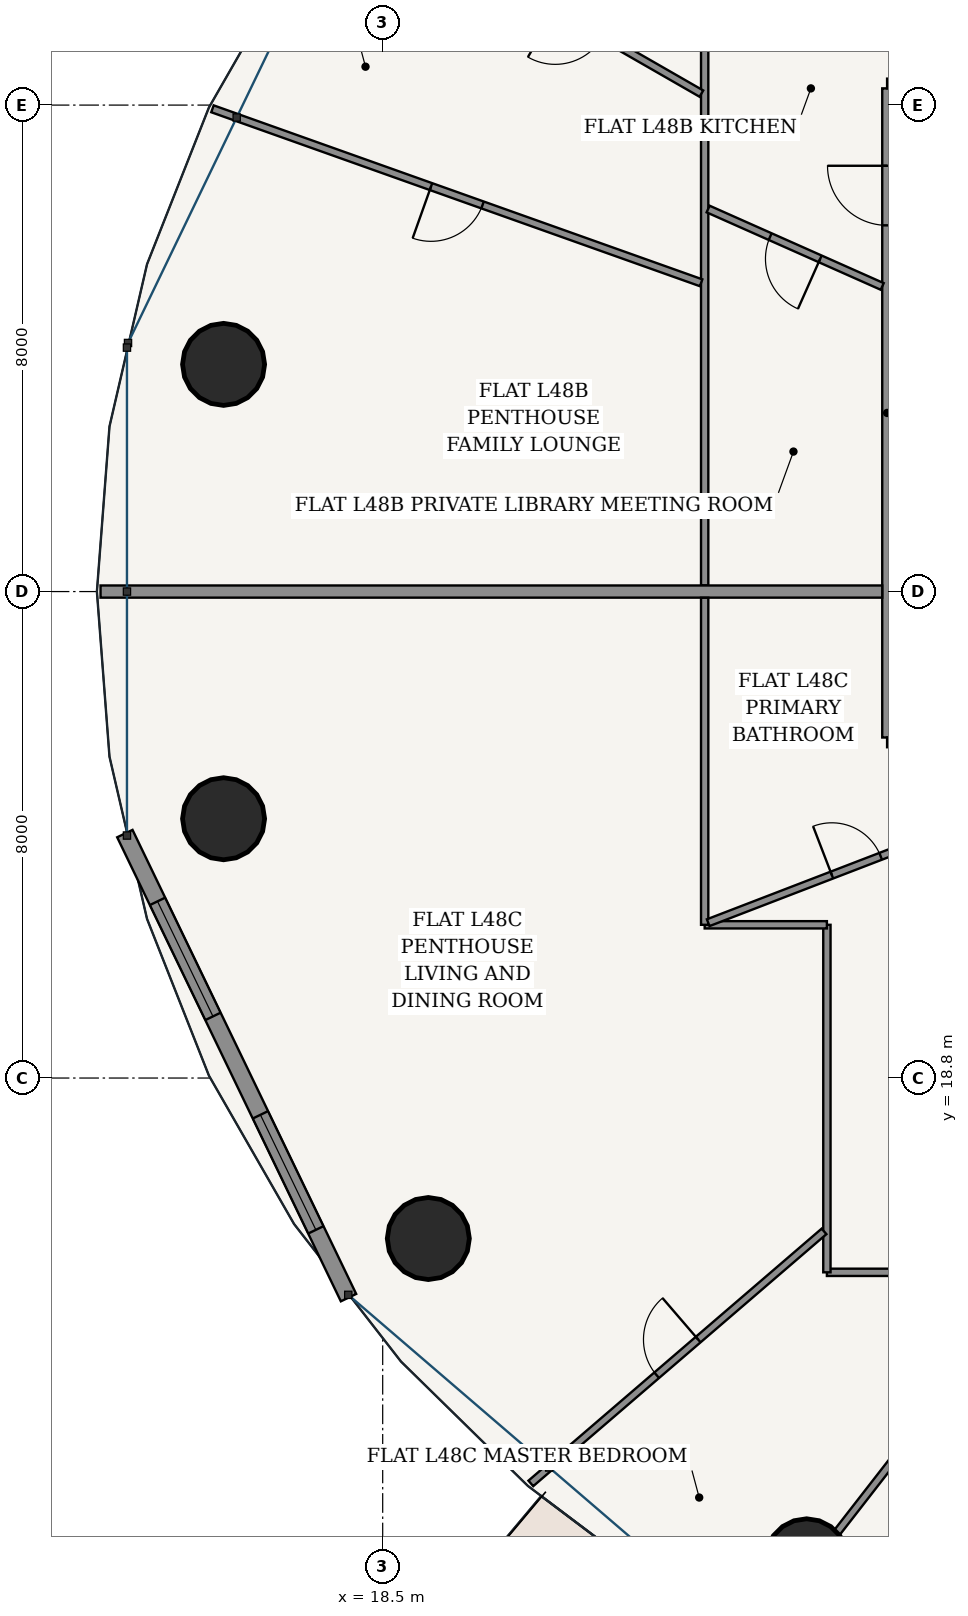
"""IFC4 building model, lengths in metres.
Left out: names, types, materials, properties, quantities, classifications, styles, units other than length and angle.
Written with IfcOpenShell. Run it as: python <this file> out.ifc"""

import sys

from ifc_helpers import new_model, si_unit, direction, frame, frame_2d, origin, origin_2d, place, context, subcontext, project, spatial, rectangle, hollow_circle, extrude, source, transform, mapped, element, fill, save


model = new_model("IFC4")
c1 = context("Model", 3, precision=1e-05, world=origin(), true_north=direction((-0.2419218956, 0.970295726276)))
c2 = subcontext(c1, "Body", "Model", "MODEL_VIEW")
j1 = project(units=[si_unit("LENGTHUNIT", "METRE"), si_unit("PLANEANGLEUNIT", "RADIAN")], contexts=[c1])
p1 = place(None, origin())
s1 = spatial("IfcSite", under=j1, at=p1, CompositionType="ELEMENT")
p2 = place(p1, origin())
s2 = spatial("IfcBuilding", under=s1, at=p2, CompositionType="ELEMENT")
p3 = place(p2, frame((0.0, 0.0, 182.2)))
s3 = spatial("IfcBuildingStorey", under=s2, at=p3, CompositionType="ELEMENT", Elevation=182.2)
for number, where, z_axis, x_axis in (
    (1, (15.883, 30.536, 0.0), (0.0, 0.0, 1.0), (1.0, 0.0, 0.0)),
    (2, (15.883, 23.064, 0.0), (0.0, 0.0, 1.0), (1.0, 0.0, 0.0)),
    (3, (19.25, 16.161, 0.0), (0.0, 0.0, 1.0), (1.0, 0.0, 0.0)),
    (4, (25.472, 10.877, 0.0), (0.0, 0.0, 1.0), (1.0, 0.0, 0.0)),
):
    element("IfcColumn", number, at=place(p3, frame(where, z_axis=z_axis, x_axis=x_axis)), inside=s3, PredefinedType="COLUMN", context=c2, shape_type="SweptSolid", body=[
        extrude(hollow_circle(Radius=0.675, WallThickness=0.042, at=origin_2d()), origin(), (0.0, 0.0, 1.0), 3.6),
    ])
p4 = place(p3, frame((14.26, 22.82, 0.0), z_axis=(0.0, 0.0, 1.0), x_axis=(0.434209827226, -0.900811759437, 0.0)))
e5 = element("IfcWall", 5, at=p4, inside=s3, PredefinedType="SOLIDWALL", context=c2, shape_type="SweptSolid", body=[
    extrude(rectangle(XDim=8.472, YDim=0.28, at=frame_2d((4.236, 0.0))), origin(), (0.0, 0.0, 1.0), 3.15),
])
p5 = place(p4, frame((1.237, 0.0, 0.85)))
e6 = element("IfcOpeningElement", 6, at=p5, cuts=e5, PredefinedType="OPENING", context=c2, shape_type="SweptSolid", body=[
    extrude(rectangle(XDim=2.1, YDim=1.95, at=frame_2d((1.05, 0.975))), frame((0.0, 0.15, 0.0), z_axis=(0.0, -1.0, 0.0), x_axis=(1.0, 0.0, 0.0)), (0.0, 0.0, 1.0), 0.3),
])
p6 = place(p4, frame((5.134, 0.0, 0.85)))
e7 = element("IfcOpeningElement", 7, at=p6, cuts=e5, PredefinedType="OPENING", context=c2, shape_type="SweptSolid", body=[
    extrude(rectangle(XDim=2.1, YDim=1.95, at=frame_2d((1.05, 0.975))), frame((0.0, 0.15, 0.0), z_axis=(0.0, -1.0, 0.0), x_axis=(1.0, 0.0, 0.0)), (0.0, 0.0, 1.0), 0.3),
])
p7 = place(p3, frame((26.795, 24.4, 0.0), z_axis=(0.0, 0.0, 1.0), x_axis=(0.0, 1.0, 0.0)))
e8 = element("IfcWall", 8, at=p7, inside=s3, PredefinedType="PARTITIONING", context=c2, shape_type="SweptSolid", body=[
    extrude(rectangle(XDim=10.675, YDim=0.16, at=frame_2d((5.337, 0.0))), origin(), (0.0, 0.0, 1.0), 2.666),
])
p8 = place(p7, frame((8.422, 0.0, 0.0)))
e9 = element("IfcOpeningElement", 9, at=p8, cuts=e8, PredefinedType="OPENING", context=c2, shape_type="SweptSolid", body=[
    extrude(rectangle(XDim=0.98, YDim=2.2, at=frame_2d((0.49, 1.1))), frame((0.0, 0.09, 0.0), z_axis=(0.0, -1.0, 0.0), x_axis=(1.0, 0.0, 0.0)), (0.0, 0.0, 1.0), 0.18),
])
for number, where, z_axis, x_axis in (
    (10, (26.795, 35.155, 0.0), (0.0, 0.0, 1.0), (1.0, 0.0, 0.0)),
    (11, (26.795, 24.32, 0.0), (0.0, 0.0, 1.0), (1.0, 0.0, 0.0)),
):
    element("IfcWall", number, at=place(p3, frame(where, z_axis=z_axis, x_axis=x_axis)), inside=s3, PredefinedType="PARTITIONING", context=c2, shape_type="SweptSolid", body=[
        extrude(rectangle(XDim=1.93, YDim=0.16, at=frame_2d((0.965, 0.0))), origin(), (0.0, 0.0, 1.0), 3.15),
    ])
p9 = place(p3, frame((23.795, 26.902, 0.0), z_axis=(0.0, 0.0, 1.0), x_axis=(0.0, 1.0, 0.0)))
e12 = element("IfcWall", 12, at=p9, inside=s3, PredefinedType="PARTITIONING", context=c2, shape_type="SweptSolid", body=[
    extrude(rectangle(XDim=11.253, YDim=0.12, at=frame_2d((5.626, 0.0))), origin(), (0.0, 0.0, 1.0), 2.666),
])
p10 = place(p9, frame((9.085, 0.0, 0.0)))
e13 = element("IfcOpeningElement", 13, at=p10, cuts=e12, PredefinedType="OPENING", context=c2, shape_type="SweptSolid", body=[
    extrude(rectangle(XDim=0.9, YDim=2.15, at=frame_2d((0.45, 1.075))), frame((0.0, 0.07, 0.0), z_axis=(0.0, -1.0, 0.0), x_axis=(1.0, 0.0, 0.0)), (0.0, 0.0, 1.0), 0.14),
])
p11 = place(p3, frame((23.741, 34.989, 0.0), z_axis=(0.0, 0.0, 1.0), x_axis=(-0.867167953258, 0.498015803808, 0.0)))
e14 = element("IfcWall", 14, at=p11, inside=s3, PredefinedType="PARTITIONING", context=c2, shape_type="SweptSolid", body=[
    extrude(rectangle(XDim=6.65, YDim=0.12, at=frame_2d((3.325, 0.0))), origin(), (0.0, 0.0, 1.0), 2.5),
])
p12 = place(p11, frame((1.873, 0.0, 0.0)))
e15 = element("IfcOpeningElement", 15, at=p12, cuts=e14, PredefinedType="OPENING", context=c2, shape_type="SweptSolid", body=[
    extrude(rectangle(XDim=0.9, YDim=2.15, at=frame_2d((0.45, 1.075))), frame((0.0, 0.07, 0.0), z_axis=(0.0, -1.0, 0.0), x_axis=(1.0, 0.0, 0.0)), (0.0, 0.0, 1.0), 0.14),
])
p13 = place(p3, frame((23.737, 31.878, 0.0), z_axis=(0.0, 0.0, 1.0), x_axis=(-0.942071057968, 0.335413359512, 0.0)))
e16 = element("IfcWall", 16, at=p13, inside=s3, PredefinedType="PARTITIONING", context=c2, shape_type="SweptSolid", body=[
    extrude(rectangle(XDim=8.53, YDim=0.12, at=frame_2d((4.265, 0.0))), origin(), (0.0, 0.0, 1.0), 2.666),
])
p14 = place(p13, frame((3.815, 0.0, 0.0)))
e17 = element("IfcOpeningElement", 17, at=p14, cuts=e16, PredefinedType="OPENING", context=c2, shape_type="SweptSolid", body=[
    extrude(rectangle(XDim=0.9, YDim=2.15, at=frame_2d((0.45, 1.075))), frame((0.0, 0.07, 0.0), z_axis=(0.0, -1.0, 0.0), x_axis=(1.0, 0.0, 0.0)), (0.0, 0.0, 1.0), 0.14),
])
p15 = place(p3, frame((28.032, 35.236, 0.0), z_axis=(0.0, 0.0, 1.0), x_axis=(-0.763321857138, 0.646018376221, 0.0)))
e18 = element("IfcWall", 18, at=p15, inside=s3, PredefinedType="PARTITIONING", context=c2, shape_type="SweptSolid", body=[
    extrude(rectangle(XDim=4.456, YDim=0.12, at=frame_2d((2.228, 0.0))), origin(), (0.0, 0.0, 1.0), 2.825),
])
p16 = place(p3, frame((26.715, 31.818, 0.0), z_axis=(0.0, 0.0, 1.0), x_axis=(-0.913750499147, 0.406275799561, 0.0)))
e19 = element("IfcWall", 19, at=p16, inside=s3, PredefinedType="PARTITIONING", context=c2, shape_type="SweptSolid", body=[
    extrude(rectangle(XDim=3.134, YDim=0.12, at=frame_2d((1.567, 0.0))), origin(), (0.0, 0.0, 1.0), 2.825),
])
p17 = place(p16, frame((1.117, 0.0, 0.0)))
e20 = element("IfcOpeningElement", 20, at=p17, cuts=e19, PredefinedType="OPENING", context=c2, shape_type="SweptSolid", body=[
    extrude(rectangle(XDim=0.9, YDim=2.15, at=frame_2d((0.45, 1.075))), frame((0.0, 0.07, 0.0), z_axis=(0.0, -1.0, 0.0), x_axis=(1.0, 0.0, 0.0)), (0.0, 0.0, 1.0), 0.14),
])
p18 = place(p3, frame((26.715, 26.8, 0.0), z_axis=(0.0, 0.0, 1.0), x_axis=(-1.0, 0.0, 0.0)))
e21 = element("IfcWall", 21, at=p18, inside=s3, PredefinedType="PARTITIONING", context=c2, shape_type="SweptSolid", body=[
    extrude(rectangle(XDim=12.855, YDim=0.2, at=frame_2d((6.427, 0.0))), origin(), (0.0, 0.0, 1.0), 2.666),
])
p19 = place(p3, frame((31.32, 15.605, 0.0), z_axis=(0.0, 0.0, 1.0), x_axis=(-1.0, 0.0, 0.0)))
e22 = element("IfcWall", 22, at=p19, inside=s3, PredefinedType="PARTITIONING", context=c2, shape_type="SweptSolid", body=[
    extrude(rectangle(XDim=5.515, YDim=0.12, at=frame_2d((2.758, 0.0))), origin(), (0.0, 0.0, 1.0), 2.666),
])
p20 = place(p3, frame((25.805, 15.605, 0.0), z_axis=(0.0, 0.0, 1.0), x_axis=(0.0, 1.0, 0.0)))
e23 = element("IfcWall", 23, at=p20, inside=s3, PredefinedType="PARTITIONING", context=c2, shape_type="SweptSolid", body=[
    extrude(rectangle(XDim=5.715, YDim=0.12, at=frame_2d((2.857, 0.0))), origin(), (0.0, 0.0, 1.0), 2.666),
])
p21 = place(p3, frame((25.805, 21.32, 0.0), z_axis=(0.0, 0.0, 1.0), x_axis=(-1.0, 0.0, 0.0)))
e24 = element("IfcWall", 24, at=p21, inside=s3, PredefinedType="PARTITIONING", context=c2, shape_type="SweptSolid", body=[
    extrude(rectangle(XDim=2.01, YDim=0.12, at=frame_2d((1.005, 0.0))), origin(), (0.0, 0.0, 1.0), 2.825),
])
p22 = place(p3, frame((23.795, 21.32, 0.0), z_axis=(0.0, 0.0, 1.0), x_axis=(0.0, 1.0, 0.0)))
e25 = element("IfcWall", 25, at=p22, inside=s3, PredefinedType="PARTITIONING", context=c2, shape_type="SweptSolid", body=[
    extrude(rectangle(XDim=5.378, YDim=0.12, at=frame_2d((2.689, 0.0))), origin(), (0.0, 0.0, 1.0), 2.666),
])
p23 = place(p3, frame((25.758, 16.278, 0.0), z_axis=(0.0, 0.0, 1.0), x_axis=(-0.758374994665, -0.651818508073, 0.0)))
e26 = element("IfcWall", 26, at=p23, inside=s3, PredefinedType="PARTITIONING", context=c2, shape_type="SweptSolid", body=[
    extrude(rectangle(XDim=6.358, YDim=0.12, at=frame_2d((3.179, 0.0))), origin(), (0.0, 0.0, 1.0), 2.666),
])
p24 = place(p23, frame((2.729, 0.0, 0.0)))
e27 = element("IfcOpeningElement", 27, at=p24, cuts=e26, PredefinedType="OPENING", context=c2, shape_type="SweptSolid", body=[
    extrude(rectangle(XDim=0.9, YDim=2.15, at=frame_2d((0.45, 1.075))), frame((0.0, 0.07, 0.0), z_axis=(0.0, -1.0, 0.0), x_axis=(1.0, 0.0, 0.0)), (0.0, 0.0, 1.0), 0.14),
])
p25 = place(p3, frame((29.259, 15.556, 0.0), z_axis=(0.0, 0.0, 1.0), x_axis=(-0.61375493029, -0.789496602617, 0.0)))
e28 = element("IfcWall", 28, at=p25, inside=s3, PredefinedType="PARTITIONING", context=c2, shape_type="SweptSolid", body=[
    extrude(rectangle(XDim=7.556, YDim=0.12, at=frame_2d((3.778, 0.0))), origin(), (0.0, 0.0, 1.0), 2.5),
])
p26 = place(p25, frame((2.325, 0.0, 0.0)))
e29 = element("IfcOpeningElement", 29, at=p26, cuts=e28, PredefinedType="OPENING", context=c2, shape_type="SweptSolid", body=[
    extrude(rectangle(XDim=0.9, YDim=2.15, at=frame_2d((0.45, 1.075))), frame((0.0, 0.07, 0.0), z_axis=(0.0, -1.0, 0.0), x_axis=(1.0, 0.0, 0.0)), (0.0, 0.0, 1.0), 0.14),
])
p27 = place(p3, frame((28.723, 23.229, 0.0), z_axis=(0.0, 0.0, 1.0), x_axis=(-0.933262385607, -0.359195378048, 0.0)))
e30 = element("IfcWall", 30, at=p27, inside=s3, PredefinedType="PARTITIONING", context=c2, shape_type="SweptSolid", body=[
    extrude(rectangle(XDim=5.219, YDim=0.12, at=frame_2d((2.609, 0.0))), origin(), (0.0, 0.0, 1.0), 2.825),
])
p28 = place(p27, frame((2.179, 0.0, 0.0)))
e31 = element("IfcOpeningElement", 31, at=p28, cuts=e30, PredefinedType="OPENING", context=c2, shape_type="SweptSolid", body=[
    extrude(rectangle(XDim=0.86, YDim=2.15, at=frame_2d((0.43, 1.075))), frame((0.0, 0.07, 0.0), z_axis=(0.0, -1.0, 0.0), x_axis=(1.0, 0.0, 0.0)), (0.0, 0.0, 1.0), 0.14),
])
m1 = source(origin(), c2, "Body", "SweptSolid", [
    extrude(rectangle(XDim=2.1, YDim=1.95, at=frame_2d((1.05, 0.975))), frame((0.0, 0.03, 0.0), z_axis=(0.0, -1.0, 0.0), x_axis=(1.0, 0.0, 0.0)), (0.0, 0.0, 1.0), 0.06),
])
p29 = place(p5, origin())
e32 = element("IfcWindow", 32, at=p29, inside=s3, PartitioningType="SINGLE_PANEL", PredefinedType="WINDOW", context=c2, shape_type="MappedRepresentation", body=[
    mapped(m1, transform((0.0, 0.0, 0.0), scale=1.0)),
])
fill(e6, e32)
p30 = place(p6, origin())
e33 = element("IfcWindow", 33, at=p30, inside=s3, PartitioningType="SINGLE_PANEL", PredefinedType="WINDOW", context=c2, shape_type="MappedRepresentation", body=[
    mapped(m1, transform((0.0, 0.0, 0.0), scale=1.0)),
])
fill(e7, e33)
m2 = source(origin(), c2, "Body", "SweptSolid", [
    extrude(rectangle(XDim=0.98, YDim=2.2, at=frame_2d((0.49, 1.1))), frame((0.0, 0.025, 0.0), z_axis=(0.0, -1.0, 0.0), x_axis=(1.0, 0.0, 0.0)), (0.0, 0.0, 1.0), 0.05),
])
p31 = place(p8, origin())
e34 = element("IfcDoor", 34, at=p31, inside=s3, OperationType="SINGLE_SWING_RIGHT", PredefinedType="DOOR", context=c2, shape_type="MappedRepresentation", body=[
    mapped(m2, transform((0.0, 0.0, 0.0), scale=1.0)),
])
fill(e9, e34)
m3 = source(origin(), c2, "Body", "SweptSolid", [
    extrude(rectangle(XDim=0.9, YDim=2.15, at=frame_2d((0.45, 1.075))), frame((0.0, 0.025, 0.0), z_axis=(0.0, -1.0, 0.0), x_axis=(1.0, 0.0, 0.0)), (0.0, 0.0, 1.0), 0.05),
])
p32 = place(p17, origin())
e35 = element("IfcDoor", 35, at=p32, inside=s3, OperationType="SINGLE_SWING_LEFT", PredefinedType="DOOR", context=c2, shape_type="MappedRepresentation", body=[
    mapped(m3, transform((0.0, 0.0, 0.0), scale=1.0)),
])
fill(e20, e35)
p33 = place(p14, origin())
e36 = element("IfcDoor", 36, at=p33, inside=s3, OperationType="SINGLE_SWING_RIGHT", PredefinedType="DOOR", context=c2, shape_type="MappedRepresentation", body=[
    mapped(m3, transform((0.0, 0.0, 0.0), scale=1.0)),
])
fill(e17, e36)
m4 = source(origin(), c2, "Body", "SweptSolid", [
    extrude(rectangle(XDim=0.86, YDim=2.15, at=frame_2d((0.43, 1.075))), frame((0.0, 0.025, 0.0), z_axis=(0.0, -1.0, 0.0), x_axis=(1.0, 0.0, 0.0)), (0.0, 0.0, 1.0), 0.05),
])
p34 = place(p28, frame((0.86, 0.0, 0.0), z_axis=(0.0, 0.0, 1.0), x_axis=(-1.0, 0.0, 0.0)))
e37 = element("IfcDoor", 37, at=p34, inside=s3, OperationType="SINGLE_SWING_LEFT", PredefinedType="DOOR", context=c2, shape_type="MappedRepresentation", body=[
    mapped(m4, transform((0.0, 0.0, 0.0), scale=1.0)),
])
fill(e31, e37)
p35 = place(p24, frame((0.9, 0.0, 0.0), z_axis=(0.0, 0.0, 1.0), x_axis=(-1.0, 0.0, 0.0)))
e38 = element("IfcDoor", 38, at=p35, inside=s3, OperationType="SINGLE_SWING_RIGHT", PredefinedType="DOOR", context=c2, shape_type="MappedRepresentation", body=[
    mapped(m3, transform((0.0, 0.0, 0.0), scale=1.0)),
])
fill(e27, e38)
save(model, sys.argv[1])
